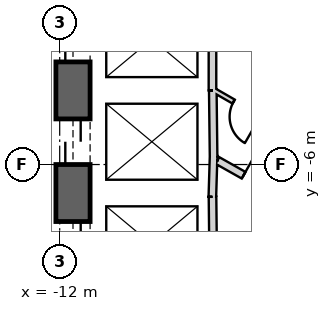
"""IFC4 building model, lengths in metres.
Left out: names, types, materials, properties, quantities, classifications, styles, units other than length and angle.
Written with IfcOpenShell. Run it as: python <this file> out.ifc"""

import sys

from ifc_helpers import new_model, si_unit, direction, frame, frame_2d, origin, place, context, subcontext, project, spatial, rectangle, extrude, element, fill, save


model = new_model("IFC4")
c1 = context("Model", 3, precision=1e-05, world=origin(), true_north=direction((0.0, 1.0)))
c2 = subcontext(c1, "Body", "Model", "MODEL_VIEW")
j1 = project(units=[si_unit("LENGTHUNIT", "METRE"), si_unit("PLANEANGLEUNIT", "RADIAN")], contexts=[c1])
p1 = place(None, origin())
s1 = spatial("IfcSite", under=j1, at=p1, CompositionType="ELEMENT")
p2 = place(p1, origin())
s2 = spatial("IfcBuilding", under=s1, at=p2, CompositionType="ELEMENT")
p3 = place(p2, frame((0.0, 0.0, 82.4)))
s3 = spatial("IfcBuildingStorey", under=s2, at=p3, CompositionType="ELEMENT", Elevation=82.4)
p4 = place(p3, frame((-11.65, 15.762, 0.0), z_axis=(0.0, 0.0, 1.0), x_axis=(0.0, -1.0, 0.0)))
e1 = element("IfcWall", 1, at=p4, inside=s3, PredefinedType="SHEAR", context=c2, shape_type="SweptSolid", body=[
    extrude(rectangle(XDim=31.523, YDim=0.9, at=frame_2d((15.762, 0.0))), origin(), (0.0, 0.0, 1.0), 4.1),
])
p5 = place(p4, frame((7.062, 0.0, 0.0)))
e2 = element("IfcOpeningElement", 2, at=p5, cuts=e1, PredefinedType="OPENING", context=c2, shape_type="SweptSolid", body=[
    extrude(rectangle(XDim=1.2, YDim=2.4, at=frame_2d((0.6, 1.2))), frame((0.0, 0.46, 0.0), z_axis=(0.0, -1.0, 0.0), x_axis=(1.0, 0.0, 0.0)), (0.0, 0.0, 1.0), 0.92),
])
p6 = place(p4, frame((9.762, 0.0, 0.0)))
e3 = element("IfcOpeningElement", 3, at=p6, cuts=e1, PredefinedType="OPENING", context=c2, shape_type="SweptSolid", body=[
    extrude(rectangle(XDim=1.2, YDim=2.4, at=frame_2d((0.6, 1.2))), frame((0.0, 0.46, 0.0), z_axis=(0.0, -1.0, 0.0), x_axis=(1.0, 0.0, 0.0)), (0.0, 0.0, 1.0), 0.92),
])
p7 = place(p4, frame((12.462, 0.0, 0.0)))
e4 = element("IfcOpeningElement", 4, at=p7, cuts=e1, PredefinedType="OPENING", context=c2, shape_type="SweptSolid", body=[
    extrude(rectangle(XDim=1.2, YDim=2.4, at=frame_2d((0.6, 1.2))), frame((0.0, 0.46, 0.0), z_axis=(0.0, -1.0, 0.0), x_axis=(1.0, 0.0, 0.0)), (0.0, 0.0, 1.0), 0.92),
])
p8 = place(p4, frame((15.162, 0.0, 0.0)))
e5 = element("IfcOpeningElement", 5, at=p8, cuts=e1, PredefinedType="OPENING", context=c2, shape_type="SweptSolid", body=[
    extrude(rectangle(XDim=1.2, YDim=2.4, at=frame_2d((0.6, 1.2))), frame((0.0, 0.46, 0.0), z_axis=(0.0, -1.0, 0.0), x_axis=(1.0, 0.0, 0.0)), (0.0, 0.0, 1.0), 0.92),
])
p9 = place(p4, frame((17.862, 0.0, 0.0)))
e6 = element("IfcOpeningElement", 6, at=p9, cuts=e1, PredefinedType="OPENING", context=c2, shape_type="SweptSolid", body=[
    extrude(rectangle(XDim=1.2, YDim=2.4, at=frame_2d((0.6, 1.2))), frame((0.0, 0.46, 0.0), z_axis=(0.0, -1.0, 0.0), x_axis=(1.0, 0.0, 0.0)), (0.0, 0.0, 1.0), 0.92),
])
p10 = place(p4, frame((20.562, 0.0, 0.0)))
e7 = element("IfcOpeningElement", 7, at=p10, cuts=e1, PredefinedType="OPENING", context=c2, shape_type="SweptSolid", body=[
    extrude(rectangle(XDim=1.2, YDim=2.4, at=frame_2d((0.6, 1.2))), frame((0.0, 0.46, 0.0), z_axis=(0.0, -1.0, 0.0), x_axis=(1.0, 0.0, 0.0)), (0.0, 0.0, 1.0), 0.92),
])
p11 = place(p4, frame((23.262, 0.0, 0.0)))
e8 = element("IfcOpeningElement", 8, at=p11, cuts=e1, PredefinedType="OPENING", context=c2, shape_type="SweptSolid", body=[
    extrude(rectangle(XDim=1.2, YDim=2.4, at=frame_2d((0.6, 1.2))), frame((0.0, 0.46, 0.0), z_axis=(0.0, -1.0, 0.0), x_axis=(1.0, 0.0, 0.0)), (0.0, 0.0, 1.0), 0.92),
])
p12 = place(p4, frame((3.612, 0.0, 0.0)))
e9 = element("IfcOpeningElement", 9, at=p12, cuts=e1, PredefinedType="OPENING", context=c2, shape_type="SweptSolid", body=[
    extrude(rectangle(XDim=1.2, YDim=2.4, at=frame_2d((0.6, 1.2))), frame((0.0, 0.46, 0.0), z_axis=(0.0, -1.0, 0.0), x_axis=(1.0, 0.0, 0.0)), (0.0, 0.0, 1.0), 0.92),
])
p13 = place(p4, frame((26.712, 0.0, 0.0)))
e10 = element("IfcOpeningElement", 10, at=p13, cuts=e1, PredefinedType="OPENING", context=c2, shape_type="SweptSolid", body=[
    extrude(rectangle(XDim=1.2, YDim=2.4, at=frame_2d((0.6, 1.2))), frame((0.0, 0.46, 0.0), z_axis=(0.0, -1.0, 0.0), x_axis=(1.0, 0.0, 0.0)), (0.0, 0.0, 1.0), 0.92),
])
p14 = place(p3, frame((-7.825, -17.97, 0.0), z_axis=(0.0, 0.0, 1.0), x_axis=(0.866028369851, 0.499994862586, 0.0)))
e11 = element("IfcWall", 11, at=p14, inside=s3, PredefinedType="SHEAR", context=c2, shape_type="SweptSolid", body=[
    extrude(rectangle(XDim=31.523, YDim=0.9, at=frame_2d((15.762, 0.0))), origin(), (0.0, 0.0, 1.0), 4.1),
])
p15 = place(p14, frame((7.062, 0.0, 0.0)))
e12 = element("IfcOpeningElement", 12, at=p15, cuts=e11, PredefinedType="OPENING", context=c2, shape_type="SweptSolid", body=[
    extrude(rectangle(XDim=1.2, YDim=2.4, at=frame_2d((0.6, 1.2))), frame((0.0, 0.46, 0.0), z_axis=(0.0, -1.0, 0.0), x_axis=(1.0, 0.0, 0.0)), (0.0, 0.0, 1.0), 0.92),
])
p16 = place(p14, frame((9.762, 0.0, 0.0)))
e13 = element("IfcOpeningElement", 13, at=p16, cuts=e11, PredefinedType="OPENING", context=c2, shape_type="SweptSolid", body=[
    extrude(rectangle(XDim=1.2, YDim=2.4, at=frame_2d((0.6, 1.2))), frame((0.0, 0.46, 0.0), z_axis=(0.0, -1.0, 0.0), x_axis=(1.0, 0.0, 0.0)), (0.0, 0.0, 1.0), 0.92),
])
p17 = place(p14, frame((12.462, 0.0, 0.0)))
e14 = element("IfcOpeningElement", 14, at=p17, cuts=e11, PredefinedType="OPENING", context=c2, shape_type="SweptSolid", body=[
    extrude(rectangle(XDim=1.2, YDim=2.4, at=frame_2d((0.6, 1.2))), frame((0.0, 0.46, 0.0), z_axis=(0.0, -1.0, 0.0), x_axis=(1.0, 0.0, 0.0)), (0.0, 0.0, 1.0), 0.92),
])
p18 = place(p14, frame((15.162, 0.0, 0.0)))
e15 = element("IfcOpeningElement", 15, at=p18, cuts=e11, PredefinedType="OPENING", context=c2, shape_type="SweptSolid", body=[
    extrude(rectangle(XDim=1.2, YDim=2.4, at=frame_2d((0.6, 1.2))), frame((0.0, 0.46, 0.0), z_axis=(0.0, -1.0, 0.0), x_axis=(1.0, 0.0, 0.0)), (0.0, 0.0, 1.0), 0.92),
])
p19 = place(p14, frame((17.862, 0.0, 0.0)))
e16 = element("IfcOpeningElement", 16, at=p19, cuts=e11, PredefinedType="OPENING", context=c2, shape_type="SweptSolid", body=[
    extrude(rectangle(XDim=1.2, YDim=2.4, at=frame_2d((0.6, 1.2))), frame((0.0, 0.46, 0.0), z_axis=(0.0, -1.0, 0.0), x_axis=(1.0, 0.0, 0.0)), (0.0, 0.0, 1.0), 0.92),
])
p20 = place(p14, frame((20.562, 0.0, 0.0)))
e17 = element("IfcOpeningElement", 17, at=p20, cuts=e11, PredefinedType="OPENING", context=c2, shape_type="SweptSolid", body=[
    extrude(rectangle(XDim=1.2, YDim=2.4, at=frame_2d((0.6, 1.2))), frame((0.0, 0.46, 0.0), z_axis=(0.0, -1.0, 0.0), x_axis=(1.0, 0.0, 0.0)), (0.0, 0.0, 1.0), 0.92),
])
p21 = place(p14, frame((26.712, 0.0, 0.0)))
e18 = element("IfcOpeningElement", 18, at=p21, cuts=e11, PredefinedType="OPENING", context=c2, shape_type="SweptSolid", body=[
    extrude(rectangle(XDim=1.2, YDim=2.4, at=frame_2d((0.6, 1.2))), frame((0.0, 0.46, 0.0), z_axis=(0.0, -1.0, 0.0), x_axis=(1.0, 0.0, 0.0)), (0.0, 0.0, 1.0), 0.92),
])
p22 = place(p14, frame((3.612, 0.0, 0.0)))
e19 = element("IfcOpeningElement", 19, at=p22, cuts=e11, PredefinedType="OPENING", context=c2, shape_type="SweptSolid", body=[
    extrude(rectangle(XDim=1.2, YDim=2.4, at=frame_2d((0.6, 1.2))), frame((0.0, 0.46, 0.0), z_axis=(0.0, -1.0, 0.0), x_axis=(1.0, 0.0, 0.0)), (0.0, 0.0, 1.0), 0.92),
])
p23 = place(p3, frame((-7.98, 4.05, 0.0), z_axis=(0.0, 0.0, 1.0), x_axis=(0.0, -1.0, 0.0)))
e20 = element("IfcWall", 20, at=p23, inside=s3, PredefinedType="PLUMBINGWALL", context=c2, shape_type="SweptSolid", body=[
    extrude(rectangle(XDim=8.1, YDim=0.2, at=frame_2d((4.05, 0.0))), origin(), (0.0, 0.0, 1.0), 3.8),
])
p24 = place(p3, frame((-7.95, -5.772, 0.0), z_axis=(0.0, 0.0, 1.0), x_axis=(-0.030803413295, -0.999525462272, 0.0)))
e21 = element("IfcWall", 21, at=p24, inside=s3, PredefinedType="PLUMBINGWALL", context=c2, shape_type="SweptSolid", body=[
    extrude(rectangle(XDim=1.078, YDim=0.2, at=frame_2d((0.539, 0.0))), origin(), (0.0, 0.0, 1.0), 3.8),
])
p25 = place(p3, frame((-7.971, -4.05, 0.0), z_axis=(0.0, 0.0, 1.0), x_axis=(0.012042535896, -0.999927486035, 0.0)))
e22 = element("IfcWall", 22, at=p25, inside=s3, PredefinedType="PLUMBINGWALL", context=c2, shape_type="SweptSolid", body=[
    extrude(rectangle(XDim=1.845, YDim=0.2, at=frame_2d((0.922, 0.0))), origin(), (0.0, 0.0, 1.0), 3.8),
])
p26 = place(p3, frame((-7.979, -6.85, 0.0), z_axis=(0.0, 0.0, 1.0), x_axis=(0.011121475088, -0.999938154483, 0.0)))
e23 = element("IfcWall", 23, at=p26, inside=s3, PredefinedType="PLUMBINGWALL", context=c2, shape_type="SweptSolid", body=[
    extrude(rectangle(XDim=2.7, YDim=0.2, at=frame_2d((1.35, 0.0))), origin(), (0.0, 0.0, 1.0), 3.8),
])
p27 = place(p3, frame((-7.849, -5.894, 0.0), z_axis=(0.0, 0.0, 1.0), x_axis=(0.871363259478, -0.490638431059, 0.0)))
e24 = element("IfcWall", 24, at=p27, inside=s3, PredefinedType="PARTITIONING", context=c2, shape_type="SweptSolid", body=[
    extrude(rectangle(XDim=2.581, YDim=0.2, at=frame_2d((1.291, 0.0))), origin(), (0.0, 0.0, 1.0), 3.8),
])
p28 = place(p27, frame((0.791, 0.0, 0.0)))
e25 = element("IfcOpeningElement", 25, at=p28, cuts=e24, PredefinedType="OPENING", context=c2, shape_type="SweptSolid", body=[
    extrude(rectangle(XDim=1.0, YDim=2.1, at=frame_2d((0.5, 1.05))), frame((0.0, 0.11, 0.0), z_axis=(0.0, -1.0, 0.0), x_axis=(1.0, 0.0, 0.0)), (0.0, 0.0, 1.0), 0.22),
])
p29 = place(p3, frame((-7.95, -4.041, 0.0), z_axis=(0.0, 0.0, 1.0), x_axis=(0.867071050325, -0.498184497639, 0.0)))
e26 = element("IfcWall", 26, at=p29, inside=s3, PredefinedType="PARTITIONING", context=c2, shape_type="SweptSolid", body=[
    extrude(rectangle(XDim=2.017, YDim=0.12, at=frame_2d((1.008, 0.0))), origin(), (0.0, 0.0, 1.0), 3.8),
])
p30 = place(p29, frame((0.608, 0.0, 0.0)))
e27 = element("IfcOpeningElement", 27, at=p30, cuts=e26, PredefinedType="OPENING", context=c2, shape_type="SweptSolid", body=[
    extrude(rectangle(XDim=0.8, YDim=2.1, at=frame_2d((0.4, 1.05))), frame((0.0, 0.07, 0.0), z_axis=(0.0, -1.0, 0.0), x_axis=(1.0, 0.0, 0.0)), (0.0, 0.0, 1.0), 0.14),
])
p31 = place(p28, origin())
e28 = element("IfcDoor", 28, at=p31, inside=s3, OperationType="SINGLE_SWING_RIGHT", PredefinedType="USERDEFINED", context=c2, shape_type="SweptSolid", body=[
    extrude(rectangle(XDim=1.0, YDim=2.1, at=frame_2d((0.5, 1.05))), frame((0.0, 0.025, 0.0), z_axis=(0.0, -1.0, 0.0), x_axis=(1.0, 0.0, 0.0)), (0.0, 0.0, 1.0), 0.05),
])
fill(e25, e28)
p32 = place(p30, origin())
e29 = element("IfcDoor", 29, at=p32, inside=s3, OperationType="SINGLE_SWING_RIGHT", PredefinedType="USERDEFINED", context=c2, shape_type="SweptSolid", body=[
    extrude(rectangle(XDim=0.8, YDim=2.1, at=frame_2d((0.4, 1.05))), frame((0.0, 0.025, 0.0), z_axis=(0.0, -1.0, 0.0), x_axis=(1.0, 0.0, 0.0)), (0.0, 0.0, 1.0), 0.05),
])
fill(e27, e29)
p33 = place(p9, origin())
e30 = element("IfcDoor", 30, at=p33, inside=s3, OperationType="SLIDING_TO_LEFT", PredefinedType="USERDEFINED", context=c2, shape_type="SweptSolid", body=[
    extrude(rectangle(XDim=1.2, YDim=2.4, at=frame_2d((0.6, 1.2))), frame((0.0, 0.025, 0.0), z_axis=(0.0, -1.0, 0.0), x_axis=(1.0, 0.0, 0.0)), (0.0, 0.0, 1.0), 0.05),
])
fill(e6, e30)
p34 = place(p10, origin())
e31 = element("IfcDoor", 31, at=p34, inside=s3, OperationType="SLIDING_TO_LEFT", PredefinedType="USERDEFINED", context=c2, shape_type="SweptSolid", body=[
    extrude(rectangle(XDim=1.2, YDim=2.4, at=frame_2d((0.6, 1.2))), frame((0.0, 0.025, 0.0), z_axis=(0.0, -1.0, 0.0), x_axis=(1.0, 0.0, 0.0)), (0.0, 0.0, 1.0), 0.05),
])
fill(e7, e31)
p35 = place(p11, origin())
e32 = element("IfcDoor", 32, at=p35, inside=s3, OperationType="SLIDING_TO_LEFT", PredefinedType="USERDEFINED", context=c2, shape_type="SweptSolid", body=[
    extrude(rectangle(XDim=1.2, YDim=2.4, at=frame_2d((0.6, 1.2))), frame((0.0, 0.025, 0.0), z_axis=(0.0, -1.0, 0.0), x_axis=(1.0, 0.0, 0.0)), (0.0, 0.0, 1.0), 0.05),
])
fill(e8, e32)
save(model, sys.argv[1])
